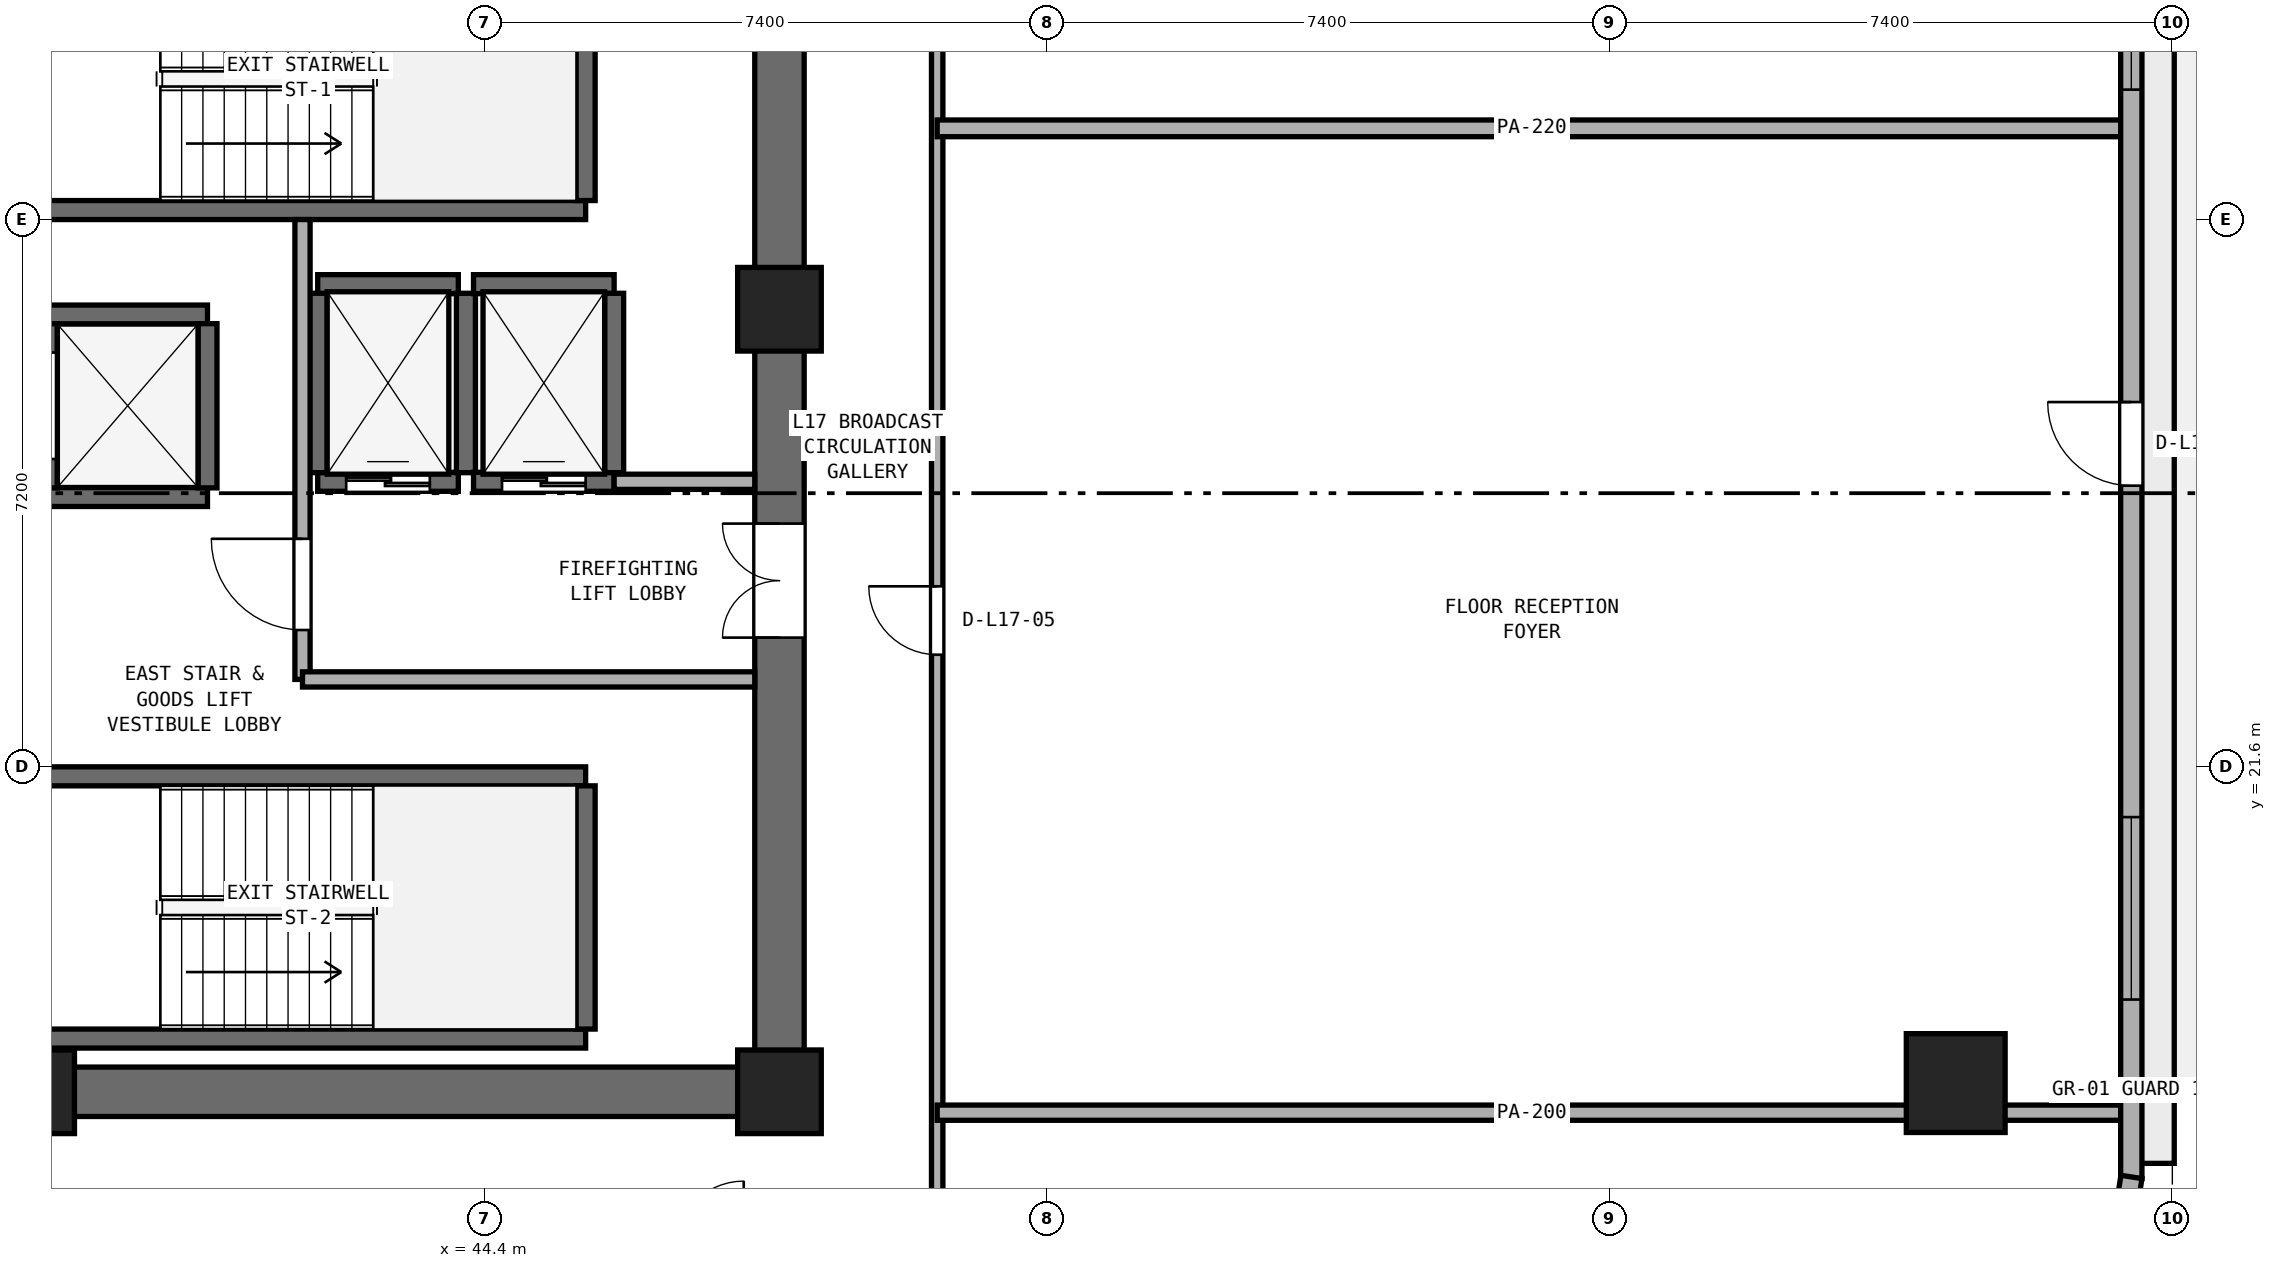
"""IFC4 building model, lengths in metres.
Left out: names, types, materials, properties, quantities, classifications, styles, units other than length and angle.
Written with IfcOpenShell. Run it as: python <this file> out.ifc"""

import sys

from ifc_helpers import new_model, si_unit, direction, frame, frame_2d, origin, origin_2d, place, context, subcontext, project, spatial, rectangle, extrude, element, fill, save


model = new_model("IFC4")
c1 = context("Model", 3, precision=1e-05, world=origin(), true_north=direction((0.0, 1.0)))
c2 = subcontext(c1, "Body", "Model", "MODEL_VIEW")
j1 = project(units=[si_unit("LENGTHUNIT", "METRE"), si_unit("PLANEANGLEUNIT", "RADIAN")], contexts=[c1])
p1 = place(None, origin())
s1 = spatial("IfcSite", under=j1, at=p1, CompositionType="ELEMENT")
p2 = place(p1, origin())
s2 = spatial("IfcBuilding", under=s1, at=p2, CompositionType="ELEMENT")
p3 = place(p2, frame((0.0, 0.0, 70.6)))
s3 = spatial("IfcBuildingStorey", under=s2, at=p3, CompositionType="ELEMENT", Elevation=70.6)
p4 = place(p3, frame((25.4, 17.325, 0.0), z_axis=(0.0, 0.0, 1.0), x_axis=(1.0, 0.0, 0.0)))
e1 = element("IfcWall", 1, at=p4, inside=s3, PredefinedType="SHEAR", context=c2, shape_type="SweptSolid", body=[
    extrude(rectangle(XDim=23.2, YDim=0.65, at=frame_2d((11.6, 0.0))), origin(), (0.0, 0.0, 1.0), 3.525),
])
p5 = place(p3, frame((48.275, 17.65, 0.0), z_axis=(0.0, 0.0, 1.0), x_axis=(0.0, 1.0, 0.0)))
e2 = element("IfcWall", 2, at=p5, inside=s3, PredefinedType="SHEAR", context=c2, shape_type="SweptSolid", body=[
    extrude(rectangle(XDim=15.1, YDim=0.65, at=frame_2d((7.55, 0.0))), origin(), (0.0, 0.0, 1.0), 3.525),
])
p6 = place(p5, frame((5.65, 0.0, 0.0)))
e3 = element("IfcOpeningElement", 3, at=p6, cuts=e2, PredefinedType="OPENING", context=c2, shape_type="SweptSolid", body=[
    extrude(rectangle(XDim=1.5, YDim=2.15, at=frame_2d((0.75, 1.075))), frame((0.0, 0.335, 0.0), z_axis=(0.0, -1.0, 0.0), x_axis=(1.0, 0.0, 0.0)), (0.0, 0.0, 1.0), 0.67),
])
for number, where, z_axis, x_axis in (
    (4, (38.45, 17.325, 0.0), (0.0, 0.0, 1.0), (1.0, 0.0, 0.0)),
    (5, (48.275, 17.325, 0.0), (0.0, 0.0, 1.0), (1.0, 0.0, 0.0)),
    (6, (48.275, 27.62, 0.0), (0.0, 0.0, 1.0), (1.0, 0.0, 0.0)),
):
    element("IfcColumn", number, at=place(p3, frame(where, z_axis=z_axis, x_axis=x_axis)), inside=s3, PredefinedType="PILASTER", context=c2, shape_type="SweptSolid", body=[
        extrude(rectangle(XDim=1.1, YDim=1.1, at=origin_2d()), origin(), (0.0, 0.0, 1.0), 3.8),
    ])
p7 = place(p3, frame((63.75, 17.44, 0.0), z_axis=(0.0, 0.0, 1.0), x_axis=(1.0, 0.0, 0.0)))
e7 = element("IfcColumn", 7, at=p7, inside=s3, PredefinedType="COLUMN", context=c2, shape_type="SweptSolid", body=[
    extrude(rectangle(XDim=1.3, YDim=1.3, at=origin_2d()), origin(), (0.0, 0.0, 1.0), 3.8),
])
p8 = place(p3, frame((38.425, 28.925, 0.0), z_axis=(0.0, 0.0, 1.0), x_axis=(1.0, 0.0, 0.0)))
e8 = element("IfcWall", 8, at=p8, inside=s3, PredefinedType="SHEAR", context=c2, shape_type="SweptSolid", body=[
    extrude(rectangle(XDim=7.3, YDim=0.25, at=frame_2d((3.65, 0.0))), origin(), (0.0, 0.0, 1.0), 3.525),
])
p9 = place(p3, frame((45.725, 29.05, 0.0), z_axis=(0.0, 0.0, 1.0), x_axis=(0.0, 1.0, 0.0)))
e9 = element("IfcWall", 9, at=p9, inside=s3, PredefinedType="SHEAR", context=c2, shape_type="SweptSolid", body=[
    extrude(rectangle(XDim=3.2, YDim=0.25, at=frame_2d((1.6, 0.0))), origin(), (0.0, 0.0, 1.0), 3.525),
])
for number, where, z_axis, x_axis in (
    (10, (38.425, 18.025, 0.0), (0.0, 0.0, 1.0), (1.0, 0.0, 0.0)),
    (11, (38.425, 21.475, 0.0), (0.0, 0.0, 1.0), (1.0, 0.0, 0.0)),
):
    element("IfcWall", number, at=place(p3, frame(where, z_axis=z_axis, x_axis=x_axis)), inside=s3, PredefinedType="SHEAR", context=c2, shape_type="SweptSolid", body=[
        extrude(rectangle(XDim=7.3, YDim=0.25, at=frame_2d((3.65, 0.0))), origin(), (0.0, 0.0, 1.0), 3.525),
    ])
p10 = place(p3, frame((45.725, 18.15, 0.0), z_axis=(0.0, 0.0, 1.0), x_axis=(0.0, 1.0, 0.0)))
e12 = element("IfcWall", 12, at=p10, inside=s3, PredefinedType="SHEAR", context=c2, shape_type="SweptSolid", body=[
    extrude(rectangle(XDim=3.2, YDim=0.25, at=frame_2d((1.6, 0.0))), origin(), (0.0, 0.0, 1.0), 3.525),
])
p11 = place(p3, frame((42.2, 25.35, 0.0), z_axis=(0.0, 0.0, 1.0), x_axis=(1.0, 0.0, 0.0)))
e13 = element("IfcWall", 13, at=p11, inside=s3, PredefinedType="SHEAR", context=c2, shape_type="SweptSolid", body=[
    extrude(rectangle(XDim=1.85, YDim=0.25, at=frame_2d((0.925, 0.0))), origin(), (0.0, 0.0, 1.0), 3.525),
])
p12 = place(p11, frame((0.375, 0.0, 0.0)))
e14 = element("IfcOpeningElement", 14, at=p12, cuts=e13, PredefinedType="OPENING", context=c2, shape_type="SweptSolid", body=[
    extrude(rectangle(XDim=1.1, YDim=2.15, at=frame_2d((0.55, 1.075))), frame((0.0, 0.135, 0.0), z_axis=(0.0, -1.0, 0.0), x_axis=(1.0, 0.0, 0.0)), (0.0, 0.0, 1.0), 0.27),
])
p13 = place(p3, frame((42.2, 27.95, 0.0), z_axis=(0.0, 0.0, 1.0), x_axis=(1.0, 0.0, 0.0)))
e15 = element("IfcWall", 15, at=p13, inside=s3, PredefinedType="SHEAR", context=c2, shape_type="SweptSolid", body=[
    extrude(rectangle(XDim=1.85, YDim=0.25, at=frame_2d((0.925, 0.0))), origin(), (0.0, 0.0, 1.0), 3.525),
])
for number, where, z_axis, x_axis in (
    (16, (42.2, 25.47, 0.0), (0.0, 0.0, 1.0), (0.0, 1.0, 0.0)),
    (17, (44.15, 25.47, 0.0), (0.0, 0.0, 1.0), (0.0, 1.0, 0.0)),
):
    element("IfcWall", number, at=place(p3, frame(where, z_axis=z_axis, x_axis=x_axis)), inside=s3, PredefinedType="SHEAR", context=c2, shape_type="SweptSolid", body=[
        extrude(rectangle(XDim=2.36, YDim=0.25, at=frame_2d((1.18, 0.0))), origin(), (0.0, 0.0, 1.0), 3.525),
    ])
p14 = place(p3, frame((44.25, 25.35, 0.0), z_axis=(0.0, 0.0, 1.0), x_axis=(1.0, 0.0, 0.0)))
e18 = element("IfcWall", 18, at=p14, inside=s3, PredefinedType="SHEAR", context=c2, shape_type="SweptSolid", body=[
    extrude(rectangle(XDim=1.85, YDim=0.25, at=frame_2d((0.925, 0.0))), origin(), (0.0, 0.0, 1.0), 3.525),
])
p15 = place(p14, frame((0.375, 0.0, 0.0)))
e19 = element("IfcOpeningElement", 19, at=p15, cuts=e18, PredefinedType="OPENING", context=c2, shape_type="SweptSolid", body=[
    extrude(rectangle(XDim=1.1, YDim=2.15, at=frame_2d((0.55, 1.075))), frame((0.0, 0.135, 0.0), z_axis=(0.0, -1.0, 0.0), x_axis=(1.0, 0.0, 0.0)), (0.0, 0.0, 1.0), 0.27),
])
p16 = place(p3, frame((44.25, 27.95, 0.0), z_axis=(0.0, 0.0, 1.0), x_axis=(1.0, 0.0, 0.0)))
e20 = element("IfcWall", 20, at=p16, inside=s3, PredefinedType="SHEAR", context=c2, shape_type="SweptSolid", body=[
    extrude(rectangle(XDim=1.85, YDim=0.25, at=frame_2d((0.925, 0.0))), origin(), (0.0, 0.0, 1.0), 3.525),
])
p17 = place(p3, frame((46.1, 25.47, 0.0), z_axis=(0.0, 0.0, 1.0), x_axis=(0.0, 1.0, 0.0)))
e21 = element("IfcWall", 21, at=p17, inside=s3, PredefinedType="SHEAR", context=c2, shape_type="SweptSolid", body=[
    extrude(rectangle(XDim=2.36, YDim=0.25, at=frame_2d((1.18, 0.0))), origin(), (0.0, 0.0, 1.0), 3.525),
])
for number, where, z_axis, x_axis in (
    (22, (38.65, 25.15, 0.0), (0.0, 0.0, 1.0), (1.0, 0.0, 0.0)),
    (23, (38.65, 27.55, 0.0), (0.0, 0.0, 1.0), (1.0, 0.0, 0.0)),
):
    element("IfcWall", number, at=place(p3, frame(where, z_axis=z_axis, x_axis=x_axis)), inside=s3, PredefinedType="SHEAR", context=c2, shape_type="SweptSolid", body=[
        extrude(rectangle(XDim=2.1, YDim=0.25, at=frame_2d((1.05, 0.0))), origin(), (0.0, 0.0, 1.0), 3.525),
    ])
p18 = place(p3, frame((38.65, 25.27, 0.0), z_axis=(0.0, 0.0, 1.0), x_axis=(0.0, 1.0, 0.0)))
e24 = element("IfcWall", 24, at=p18, inside=s3, PredefinedType="SHEAR", context=c2, shape_type="SweptSolid", body=[
    extrude(rectangle(XDim=2.16, YDim=0.25, at=frame_2d((1.08, 0.0))), origin(), (0.0, 0.0, 1.0), 3.525),
])
p19 = place(p18, frame((0.38, 0.0, 0.0)))
e25 = element("IfcOpeningElement", 25, at=p19, cuts=e24, PredefinedType="OPENING", context=c2, shape_type="SweptSolid", body=[
    extrude(rectangle(XDim=1.4, YDim=2.2, at=frame_2d((0.7, 1.1))), frame((0.0, 0.135, 0.0), z_axis=(0.0, -1.0, 0.0), x_axis=(1.0, 0.0, 0.0)), (0.0, 0.0, 1.0), 0.27),
])
p20 = place(p3, frame((40.75, 25.27, 0.0), z_axis=(0.0, 0.0, 1.0), x_axis=(0.0, 1.0, 0.0)))
e26 = element("IfcWall", 26, at=p20, inside=s3, PredefinedType="SHEAR", context=c2, shape_type="SweptSolid", body=[
    extrude(rectangle(XDim=2.16, YDim=0.25, at=frame_2d((1.08, 0.0))), origin(), (0.0, 0.0, 1.0), 3.525),
])
p21 = place(p3, frame((42.0, 22.75, 0.0), z_axis=(0.0, 0.0, 1.0), x_axis=(0.0, 1.0, 0.0)))
e27 = element("IfcWall", 27, at=p21, inside=s3, PredefinedType="SOLIDWALL", context=c2, shape_type="SweptSolid", body=[
    extrude(rectangle(XDim=6.05, YDim=0.2, at=frame_2d((3.025, 0.0))), origin(), (0.0, 0.0, 1.0), 3.525),
])
p22 = place(p21, frame((0.65, 0.0, 0.0)))
e28 = element("IfcOpeningElement", 28, at=p22, cuts=e27, PredefinedType="OPENING", context=c2, shape_type="SweptSolid", body=[
    extrude(rectangle(XDim=1.2, YDim=2.15, at=frame_2d((0.6, 1.075))), frame((0.0, 0.11, 0.0), z_axis=(0.0, -1.0, 0.0), x_axis=(1.0, 0.0, 0.0)), (0.0, 0.0, 1.0), 0.22),
])
p23 = place(p3, frame((42.0, 22.75, 0.0), z_axis=(0.0, 0.0, 1.0), x_axis=(1.0, 0.0, 0.0)))
e29 = element("IfcWall", 29, at=p23, inside=s3, PredefinedType="SOLIDWALL", context=c2, shape_type="SweptSolid", body=[
    extrude(rectangle(XDim=5.95, YDim=0.2, at=frame_2d((2.975, 0.0))), origin(), (0.0, 0.0, 1.0), 3.525),
])
p24 = place(p3, frame((46.1, 25.35, 0.0), z_axis=(0.0, 0.0, 1.0), x_axis=(1.0, 0.0, 0.0)))
e30 = element("IfcWall", 30, at=p24, inside=s3, PredefinedType="SOLIDWALL", context=c2, shape_type="SweptSolid", body=[
    extrude(rectangle(XDim=1.85, YDim=0.2, at=frame_2d((0.925, 0.0))), origin(), (0.0, 0.0, 1.0), 3.525),
])
p25 = place(p3, frame((50.35, 15.25, 0.0), z_axis=(0.0, 0.0, 1.0), x_axis=(0.0, 1.0, 0.0)))
e31 = element("IfcWall", 31, at=p25, inside=s3, PredefinedType="PARTITIONING", context=c2, shape_type="SweptSolid", body=[
    extrude(rectangle(XDim=19.9, YDim=0.15, at=frame_2d((9.95, 0.0))), origin(), (0.0, 0.0, 1.0), 3.525),
])
p26 = place(p25, frame((7.825, 0.0, 0.0)))
e32 = element("IfcOpeningElement", 32, at=p26, cuts=e31, PredefinedType="OPENING", context=c2, shape_type="SweptSolid", body=[
    extrude(rectangle(XDim=0.9, YDim=2.1, at=frame_2d((0.45, 1.05))), frame((0.0, 0.085, 0.0), z_axis=(0.0, -1.0, 0.0), x_axis=(1.0, 0.0, 0.0)), (0.0, 0.0, 1.0), 0.17),
])
p27 = place(p25, frame((15.925, 0.0, 0.0)))
e33 = element("IfcOpeningElement", 33, at=p27, cuts=e31, PredefinedType="OPENING", context=c2, shape_type="SweptSolid", body=[
    extrude(rectangle(XDim=1.0, YDim=2.12, at=frame_2d((0.5, 1.06))), frame((0.0, 0.085, 0.0), z_axis=(0.0, -1.0, 0.0), x_axis=(1.0, 0.0, 0.0)), (0.0, 0.0, 1.0), 0.17),
])
p28 = place(p3, frame((50.35, 17.05, 0.0), z_axis=(0.0, 0.0, 1.0), x_axis=(1.0, 0.0, 0.0)))
e34 = element("IfcWall", 34, at=p28, inside=s3, PredefinedType="PARTITIONING", context=c2, shape_type="SweptSolid", body=[
    extrude(rectangle(XDim=15.645, YDim=0.2, at=frame_2d((7.823, 0.0))), origin(), (0.0, 0.0, 1.0), 3.525),
])
p29 = place(p3, frame((50.35, 30.0, 0.0), z_axis=(0.0, 0.0, 1.0), x_axis=(1.0, 0.0, 0.0)))
e35 = element("IfcWall", 35, at=p29, inside=s3, PredefinedType="PARTITIONING", context=c2, shape_type="SweptSolid", body=[
    extrude(rectangle(XDim=15.645, YDim=0.22, at=frame_2d((7.823, 0.0))), origin(), (0.0, 0.0, 1.0), 3.525),
])
p30 = place(p3, frame((66.06, 16.183, 0.0), z_axis=(0.0, 0.0, 1.0), x_axis=(0.0, 1.0, 0.0)))
e36 = element("IfcWall", 36, at=p30, inside=s3, PredefinedType="STANDARD", context=c2, shape_type="SweptSolid", body=[
    extrude(rectangle(XDim=19.331, YDim=0.28, at=frame_2d((9.666, 0.0))), origin(), (0.0, 0.0, 1.0), 3.525),
])
p31 = place(p30, frame((9.115, 0.0, 0.0)))
e37 = element("IfcOpeningElement", 37, at=p31, cuts=e36, PredefinedType="OPENING", context=c2, shape_type="SweptSolid", body=[
    extrude(rectangle(XDim=1.1, YDim=2.2, at=frame_2d((0.55, 1.1))), frame((0.0, 0.15, 0.0), z_axis=(0.0, -1.0, 0.0), x_axis=(1.0, 0.0, 0.0)), (0.0, 0.0, 1.0), 0.3),
])
p32 = place(p30, frame((2.355, 0.0, 0.9)))
e38 = element("IfcOpeningElement", 38, at=p32, cuts=e36, PredefinedType="OPENING", context=c2, shape_type="SweptSolid", body=[
    extrude(rectangle(XDim=2.4, YDim=1.75, at=frame_2d((1.2, 0.875))), frame((0.0, 0.15, 0.0), z_axis=(0.0, -1.0, 0.0), x_axis=(1.0, 0.0, 0.0)), (0.0, 0.0, 1.0), 0.3),
])
p33 = place(p30, frame((14.326, 0.0, 0.9)))
e39 = element("IfcOpeningElement", 39, at=p33, cuts=e36, PredefinedType="OPENING", context=c2, shape_type="SweptSolid", body=[
    extrude(rectangle(XDim=2.4, YDim=1.75, at=frame_2d((1.2, 0.875))), frame((0.0, 0.15, 0.0), z_axis=(0.0, -1.0, 0.0), x_axis=(1.0, 0.0, 0.0)), (0.0, 0.0, 1.0), 0.3),
])
p34 = place(p3, frame((65.867, 14.943, 0.0), z_axis=(0.0, 0.0, 1.0), x_axis=(0.152014078361, 0.988378328364, 0.0)))
e40 = element("IfcWall", 40, at=p34, inside=s3, PredefinedType="STANDARD", context=c2, shape_type="SweptSolid", body=[
    extrude(rectangle(XDim=1.277, YDim=0.28, at=frame_2d((0.638, 0.0))), origin(), (0.0, 0.0, 1.0), 3.525),
])
p35 = place(p12, origin())
e41 = element("IfcDoor", 41, at=p35, inside=s3, OperationType="DOUBLE_DOOR_SLIDING", PredefinedType="DOOR", context=c2, shape_type="SweptSolid", body=[
    extrude(rectangle(XDim=1.1, YDim=2.15, at=frame_2d((0.55, 1.075))), frame((0.0, 0.025, 0.0), z_axis=(0.0, -1.0, 0.0), x_axis=(1.0, 0.0, 0.0)), (0.0, 0.0, 1.0), 0.05),
])
fill(e14, e41)
p36 = place(p15, origin())
e42 = element("IfcDoor", 42, at=p36, inside=s3, OperationType="DOUBLE_DOOR_SLIDING", PredefinedType="DOOR", context=c2, shape_type="SweptSolid", body=[
    extrude(rectangle(XDim=1.1, YDim=2.15, at=frame_2d((0.55, 1.075))), frame((0.0, 0.025, 0.0), z_axis=(0.0, -1.0, 0.0), x_axis=(1.0, 0.0, 0.0)), (0.0, 0.0, 1.0), 0.05),
])
fill(e19, e42)
p37 = place(p22, origin())
e43 = element("IfcDoor", 43, at=p37, inside=s3, OperationType="SINGLE_SWING_RIGHT", PredefinedType="DOOR", context=c2, shape_type="SweptSolid", body=[
    extrude(rectangle(XDim=1.2, YDim=2.15, at=frame_2d((0.6, 1.075))), frame((0.0, 0.025, 0.0), z_axis=(0.0, -1.0, 0.0), x_axis=(1.0, 0.0, 0.0)), (0.0, 0.0, 1.0), 0.05),
])
fill(e28, e43)
p38 = place(p6, origin())
e44 = element("IfcDoor", 44, at=p38, inside=s3, OperationType="DOUBLE_DOOR_SINGLE_SWING", PredefinedType="DOOR", context=c2, shape_type="SweptSolid", body=[
    extrude(rectangle(XDim=1.5, YDim=2.15, at=frame_2d((0.75, 1.075))), frame((0.0, 0.025, 0.0), z_axis=(0.0, -1.0, 0.0), x_axis=(1.0, 0.0, 0.0)), (0.0, 0.0, 1.0), 0.05),
])
fill(e3, e44)
p39 = place(p26, origin())
e45 = element("IfcDoor", 45, at=p39, inside=s3, OperationType="SINGLE_SWING_RIGHT", PredefinedType="DOOR", context=c2, shape_type="SweptSolid", body=[
    extrude(rectangle(XDim=0.9, YDim=2.1, at=frame_2d((0.45, 1.05))), frame((0.0, 0.025, 0.0), z_axis=(0.0, -1.0, 0.0), x_axis=(1.0, 0.0, 0.0)), (0.0, 0.0, 1.0), 0.05),
])
fill(e32, e45)
p40 = place(p31, origin())
e46 = element("IfcDoor", 46, at=p40, inside=s3, OperationType="SINGLE_SWING_RIGHT", PredefinedType="DOOR", context=c2, shape_type="SweptSolid", body=[
    extrude(rectangle(XDim=1.1, YDim=2.2, at=frame_2d((0.55, 1.1))), frame((0.0, 0.025, 0.0), z_axis=(0.0, -1.0, 0.0), x_axis=(1.0, 0.0, 0.0)), (0.0, 0.0, 1.0), 0.05),
])
fill(e37, e46)
p41 = place(p32, origin())
e47 = element("IfcWindow", 47, at=p41, inside=s3, PartitioningType="SINGLE_PANEL", PredefinedType="WINDOW", context=c2, shape_type="SweptSolid", body=[
    extrude(rectangle(XDim=2.4, YDim=1.75, at=frame_2d((1.2, 0.875))), frame((0.0, 0.03, 0.0), z_axis=(0.0, -1.0, 0.0), x_axis=(1.0, 0.0, 0.0)), (0.0, 0.0, 1.0), 0.06),
])
fill(e38, e47)
p42 = place(p33, origin())
e48 = element("IfcWindow", 48, at=p42, inside=s3, PartitioningType="SINGLE_PANEL", PredefinedType="WINDOW", context=c2, shape_type="SweptSolid", body=[
    extrude(rectangle(XDim=2.4, YDim=1.75, at=frame_2d((1.2, 0.875))), frame((0.0, 0.03, 0.0), z_axis=(0.0, -1.0, 0.0), x_axis=(1.0, 0.0, 0.0)), (0.0, 0.0, 1.0), 0.06),
])
fill(e39, e48)
save(model, sys.argv[1])
